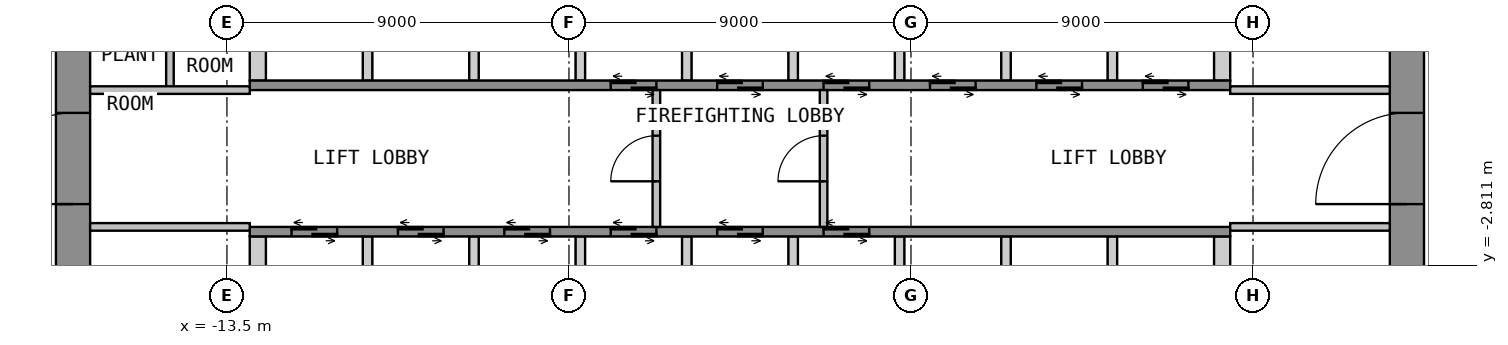
"""IFC4 building model, lengths in metres.
Left out: names, types, materials, properties, quantities, classifications, styles, units other than length and angle.
Written with IfcOpenShell. Run it as: python <this file> out.ifc"""

import sys

from ifc_helpers import new_model, si_unit, direction, frame, frame_2d, origin, place, context, subcontext, project, spatial, polyline, rectangle, outline, extrude, element, fill, save


model = new_model("IFC4")
c1 = context("Model", 3, precision=1e-05, world=origin(), true_north=direction((0.0, 1.0)))
c2 = subcontext(c1, "Body", "Model", "MODEL_VIEW")
j1 = project(units=[si_unit("LENGTHUNIT", "METRE"), si_unit("PLANEANGLEUNIT", "RADIAN")], contexts=[c1])
p1 = place(None, origin())
s1 = spatial("IfcSite", under=j1, at=p1, CompositionType="ELEMENT")
p2 = place(p1, origin())
s2 = spatial("IfcBuilding", under=s1, at=p2, CompositionType="ELEMENT")
p3 = place(p2, frame((0.0, 0.0, 15.6)))
s3 = spatial("IfcBuildingStorey", under=s2, at=p3, CompositionType="ELEMENT", Elevation=15.6)
p4 = place(p3, frame((-17.55, -12.6, 0.0), z_axis=(0.0, 0.0, 1.0), x_axis=(0.0, 1.0, 0.0)))
e1 = element("IfcWall", 1, at=p4, inside=s3, PredefinedType="SHEAR", context=c2, shape_type="SweptSolid", body=[
    extrude(rectangle(XDim=25.2, YDim=0.9, at=frame_2d((12.6, 0.0))), origin(), (0.0, 0.0, 1.0), 4.4),
])
p5 = place(p4, frame((11.4, 0.0, 0.0)))
e2 = element("IfcOpeningElement", 2, at=p5, cuts=e1, PredefinedType="OPENING", context=c2, shape_type="SweptSolid", body=[
    extrude(rectangle(XDim=2.4, YDim=2.1, at=frame_2d((1.2, 1.05))), frame((0.0, 0.46, 0.0), z_axis=(0.0, -1.0, 0.0), x_axis=(1.0, 0.0, 0.0)), (0.0, 0.0, 1.0), 0.92),
])
p6 = place(p3, frame((17.55, -12.6, 0.0), z_axis=(0.0, 0.0, 1.0), x_axis=(0.0, 1.0, 0.0)))
e3 = element("IfcWall", 3, at=p6, inside=s3, PredefinedType="SHEAR", context=c2, shape_type="SweptSolid", body=[
    extrude(rectangle(XDim=25.2, YDim=0.9, at=frame_2d((12.6, 0.0))), origin(), (0.0, 0.0, 1.0), 4.4),
])
p7 = place(p6, frame((11.4, 0.0, 0.0)))
e4 = element("IfcOpeningElement", 4, at=p7, cuts=e3, PredefinedType="OPENING", context=c2, shape_type="SweptSolid", body=[
    extrude(rectangle(XDim=2.4, YDim=2.1, at=frame_2d((1.2, 1.05))), frame((0.0, 0.46, 0.0), z_axis=(0.0, -1.0, 0.0), x_axis=(1.0, 0.0, 0.0)), (0.0, 0.0, 1.0), 0.92),
])
p8 = place(p3, origin())
e5 = element("IfcWall", 5, at=p8, inside=s3, PredefinedType="SHEAR", context=c2, shape_type="SweptSolid", body=[
    extrude(outline(polyline([(-12.9, 2.05), (-12.475, 2.05), (-12.475, 4.75), (-12.9, 4.75), (-12.9, 2.05)])), origin(), (0.0, 0.0, 1.0), 4.4),
])
p9 = place(p3, origin())
e6 = element("IfcWall", 6, at=p9, inside=s3, PredefinedType="SHEAR", context=c2, shape_type="SweptSolid", body=[
    extrude(outline(polyline([(-9.925, 2.05), (-9.675, 2.05), (-9.675, 4.75), (-9.925, 4.75), (-9.925, 2.05)])), origin(), (0.0, 0.0, 1.0), 4.4),
])
p10 = place(p3, origin())
e7 = element("IfcWall", 7, at=p10, inside=s3, PredefinedType="SHEAR", context=c2, shape_type="SweptSolid", body=[
    extrude(outline(polyline([(-7.125, 2.05), (-6.875, 2.05), (-6.875, 4.75), (-7.125, 4.75), (-7.125, 2.05)])), origin(), (0.0, 0.0, 1.0), 4.4),
])
p11 = place(p3, origin())
e8 = element("IfcWall", 8, at=p11, inside=s3, PredefinedType="SHEAR", context=c2, shape_type="SweptSolid", body=[
    extrude(outline(polyline([(-4.325, 2.05), (-4.075, 2.05), (-4.075, 4.75), (-4.325, 4.75), (-4.325, 2.05)])), origin(), (0.0, 0.0, 1.0), 4.4),
])
p12 = place(p3, origin())
e9 = element("IfcWall", 9, at=p12, inside=s3, PredefinedType="SHEAR", context=c2, shape_type="SweptSolid", body=[
    extrude(outline(polyline([(-1.525, 2.05), (-1.275, 2.05), (-1.275, 4.75), (-1.525, 4.75), (-1.525, 2.05)])), origin(), (0.0, 0.0, 1.0), 4.4),
])
p13 = place(p3, origin())
e10 = element("IfcWall", 10, at=p13, inside=s3, PredefinedType="SHEAR", context=c2, shape_type="SweptSolid", body=[
    extrude(outline(polyline([(1.275, 2.05), (1.525, 2.05), (1.525, 4.75), (1.275, 4.75), (1.275, 2.05)])), origin(), (0.0, 0.0, 1.0), 4.4),
])
p14 = place(p3, origin())
e11 = element("IfcWall", 11, at=p14, inside=s3, PredefinedType="SHEAR", context=c2, shape_type="SweptSolid", body=[
    extrude(outline(polyline([(4.075, 2.05), (4.325, 2.05), (4.325, 4.75), (4.075, 4.75), (4.075, 2.05)])), origin(), (0.0, 0.0, 1.0), 4.4),
])
p15 = place(p3, origin())
e12 = element("IfcWall", 12, at=p15, inside=s3, PredefinedType="SHEAR", context=c2, shape_type="SweptSolid", body=[
    extrude(outline(polyline([(6.875, 2.05), (7.125, 2.05), (7.125, 4.75), (6.875, 4.75), (6.875, 2.05)])), origin(), (0.0, 0.0, 1.0), 4.4),
])
p16 = place(p3, origin())
e13 = element("IfcWall", 13, at=p16, inside=s3, PredefinedType="SHEAR", context=c2, shape_type="SweptSolid", body=[
    extrude(outline(polyline([(9.675, 2.05), (9.925, 2.05), (9.925, 4.75), (9.675, 4.75), (9.675, 2.05)])), origin(), (0.0, 0.0, 1.0), 4.4),
])
p17 = place(p3, origin())
e14 = element("IfcWall", 14, at=p17, inside=s3, PredefinedType="SHEAR", context=c2, shape_type="SweptSolid", body=[
    extrude(outline(polyline([(12.475, 2.05), (12.9, 2.05), (12.9, 4.75), (12.475, 4.75), (12.475, 2.05)])), origin(), (0.0, 0.0, 1.0), 4.4),
])
p18 = place(p3, frame((-12.9, 1.925, 0.0), z_axis=(0.0, 0.0, 1.0), x_axis=(1.0, 0.0, 0.0)))
e15 = element("IfcWall", 15, at=p18, inside=s3, PredefinedType="SHEAR", context=c2, shape_type="SweptSolid", body=[
    extrude(rectangle(XDim=25.8, YDim=0.25, at=frame_2d((12.9, 0.0))), origin(), (0.0, 0.0, 1.0), 4.4),
])
p19 = place(p18, frame((9.5, 0.0, 0.0)))
e16 = element("IfcOpeningElement", 16, at=p19, cuts=e15, PredefinedType="OPENING", context=c2, shape_type="SweptSolid", body=[
    extrude(rectangle(XDim=1.2, YDim=2.1, at=frame_2d((0.6, 1.05))), frame((0.0, 0.135, 0.0), z_axis=(0.0, -1.0, 0.0), x_axis=(1.0, 0.0, 0.0)), (0.0, 0.0, 1.0), 0.27),
])
p20 = place(p18, frame((12.3, 0.0, 0.0)))
e17 = element("IfcOpeningElement", 17, at=p20, cuts=e15, PredefinedType="OPENING", context=c2, shape_type="SweptSolid", body=[
    extrude(rectangle(XDim=1.2, YDim=2.1, at=frame_2d((0.6, 1.05))), frame((0.0, 0.135, 0.0), z_axis=(0.0, -1.0, 0.0), x_axis=(1.0, 0.0, 0.0)), (0.0, 0.0, 1.0), 0.27),
])
p21 = place(p18, frame((15.1, 0.0, 0.0)))
e18 = element("IfcOpeningElement", 18, at=p21, cuts=e15, PredefinedType="OPENING", context=c2, shape_type="SweptSolid", body=[
    extrude(rectangle(XDim=1.2, YDim=2.1, at=frame_2d((0.6, 1.05))), frame((0.0, 0.135, 0.0), z_axis=(0.0, -1.0, 0.0), x_axis=(1.0, 0.0, 0.0)), (0.0, 0.0, 1.0), 0.27),
])
p22 = place(p18, frame((17.9, 0.0, 0.0)))
e19 = element("IfcOpeningElement", 19, at=p22, cuts=e15, PredefinedType="OPENING", context=c2, shape_type="SweptSolid", body=[
    extrude(rectangle(XDim=1.2, YDim=2.1, at=frame_2d((0.6, 1.05))), frame((0.0, 0.135, 0.0), z_axis=(0.0, -1.0, 0.0), x_axis=(1.0, 0.0, 0.0)), (0.0, 0.0, 1.0), 0.27),
])
p23 = place(p18, frame((20.7, 0.0, 0.0)))
e20 = element("IfcOpeningElement", 20, at=p23, cuts=e15, PredefinedType="OPENING", context=c2, shape_type="SweptSolid", body=[
    extrude(rectangle(XDim=1.2, YDim=2.1, at=frame_2d((0.6, 1.05))), frame((0.0, 0.135, 0.0), z_axis=(0.0, -1.0, 0.0), x_axis=(1.0, 0.0, 0.0)), (0.0, 0.0, 1.0), 0.27),
])
p24 = place(p18, frame((23.5, 0.0, 0.0)))
e21 = element("IfcOpeningElement", 21, at=p24, cuts=e15, PredefinedType="OPENING", context=c2, shape_type="SweptSolid", body=[
    extrude(rectangle(XDim=1.2, YDim=2.1, at=frame_2d((0.6, 1.05))), frame((0.0, 0.135, 0.0), z_axis=(0.0, -1.0, 0.0), x_axis=(1.0, 0.0, 0.0)), (0.0, 0.0, 1.0), 0.27),
])
p25 = place(p3, origin())
e22 = element("IfcWall", 22, at=p25, inside=s3, PredefinedType="SHEAR", context=c2, shape_type="SweptSolid", body=[
    extrude(outline(polyline([(-12.9, -4.75), (-12.475, -4.75), (-12.475, -2.05), (-12.9, -2.05), (-12.9, -4.75)])), origin(), (0.0, 0.0, 1.0), 4.4),
])
p26 = place(p3, origin())
e23 = element("IfcWall", 23, at=p26, inside=s3, PredefinedType="SHEAR", context=c2, shape_type="SweptSolid", body=[
    extrude(outline(polyline([(-9.925, -4.75), (-9.675, -4.75), (-9.675, -2.05), (-9.925, -2.05), (-9.925, -4.75)])), origin(), (0.0, 0.0, 1.0), 4.4),
])
p27 = place(p3, origin())
e24 = element("IfcWall", 24, at=p27, inside=s3, PredefinedType="SHEAR", context=c2, shape_type="SweptSolid", body=[
    extrude(outline(polyline([(-7.125, -4.75), (-6.875, -4.75), (-6.875, -2.05), (-7.125, -2.05), (-7.125, -4.75)])), origin(), (0.0, 0.0, 1.0), 4.4),
])
p28 = place(p3, origin())
e25 = element("IfcWall", 25, at=p28, inside=s3, PredefinedType="SHEAR", context=c2, shape_type="SweptSolid", body=[
    extrude(outline(polyline([(-4.325, -4.75), (-4.075, -4.75), (-4.075, -2.05), (-4.325, -2.05), (-4.325, -4.75)])), origin(), (0.0, 0.0, 1.0), 4.4),
])
p29 = place(p3, origin())
e26 = element("IfcWall", 26, at=p29, inside=s3, PredefinedType="SHEAR", context=c2, shape_type="SweptSolid", body=[
    extrude(outline(polyline([(-1.525, -4.75), (-1.275, -4.75), (-1.275, -2.05), (-1.525, -2.05), (-1.525, -4.75)])), origin(), (0.0, 0.0, 1.0), 4.4),
])
p30 = place(p3, origin())
e27 = element("IfcWall", 27, at=p30, inside=s3, PredefinedType="SHEAR", context=c2, shape_type="SweptSolid", body=[
    extrude(outline(polyline([(1.275, -4.75), (1.525, -4.75), (1.525, -2.05), (1.275, -2.05), (1.275, -4.75)])), origin(), (0.0, 0.0, 1.0), 4.4),
])
p31 = place(p3, origin())
e28 = element("IfcWall", 28, at=p31, inside=s3, PredefinedType="SHEAR", context=c2, shape_type="SweptSolid", body=[
    extrude(outline(polyline([(4.075, -4.75), (4.325, -4.75), (4.325, -2.05), (4.075, -2.05), (4.075, -4.75)])), origin(), (0.0, 0.0, 1.0), 4.4),
])
p32 = place(p3, origin())
e29 = element("IfcWall", 29, at=p32, inside=s3, PredefinedType="SHEAR", context=c2, shape_type="SweptSolid", body=[
    extrude(outline(polyline([(6.875, -4.75), (7.125, -4.75), (7.125, -2.05), (6.875, -2.05), (6.875, -4.75)])), origin(), (0.0, 0.0, 1.0), 4.4),
])
p33 = place(p3, origin())
e30 = element("IfcWall", 30, at=p33, inside=s3, PredefinedType="SHEAR", context=c2, shape_type="SweptSolid", body=[
    extrude(outline(polyline([(9.675, -4.75), (9.925, -4.75), (9.925, -2.05), (9.675, -2.05), (9.675, -4.75)])), origin(), (0.0, 0.0, 1.0), 4.4),
])
p34 = place(p3, origin())
e31 = element("IfcWall", 31, at=p34, inside=s3, PredefinedType="SHEAR", context=c2, shape_type="SweptSolid", body=[
    extrude(outline(polyline([(12.475, -4.75), (12.9, -4.75), (12.9, -2.05), (12.475, -2.05), (12.475, -4.75)])), origin(), (0.0, 0.0, 1.0), 4.4),
])
p35 = place(p3, frame((-12.9, -1.925, 0.0), z_axis=(0.0, 0.0, 1.0), x_axis=(1.0, 0.0, 0.0)))
e32 = element("IfcWall", 32, at=p35, inside=s3, PredefinedType="SHEAR", context=c2, shape_type="SweptSolid", body=[
    extrude(rectangle(XDim=25.8, YDim=0.25, at=frame_2d((12.9, 0.0))), origin(), (0.0, 0.0, 1.0), 4.4),
])
p36 = place(p35, frame((1.1, 0.0, 0.0)))
e33 = element("IfcOpeningElement", 33, at=p36, cuts=e32, PredefinedType="OPENING", context=c2, shape_type="SweptSolid", body=[
    extrude(rectangle(XDim=1.2, YDim=2.1, at=frame_2d((0.6, 1.05))), frame((0.0, 0.135, 0.0), z_axis=(0.0, -1.0, 0.0), x_axis=(1.0, 0.0, 0.0)), (0.0, 0.0, 1.0), 0.27),
])
p37 = place(p35, frame((3.9, 0.0, 0.0)))
e34 = element("IfcOpeningElement", 34, at=p37, cuts=e32, PredefinedType="OPENING", context=c2, shape_type="SweptSolid", body=[
    extrude(rectangle(XDim=1.2, YDim=2.1, at=frame_2d((0.6, 1.05))), frame((0.0, 0.135, 0.0), z_axis=(0.0, -1.0, 0.0), x_axis=(1.0, 0.0, 0.0)), (0.0, 0.0, 1.0), 0.27),
])
p38 = place(p35, frame((6.7, 0.0, 0.0)))
e35 = element("IfcOpeningElement", 35, at=p38, cuts=e32, PredefinedType="OPENING", context=c2, shape_type="SweptSolid", body=[
    extrude(rectangle(XDim=1.2, YDim=2.1, at=frame_2d((0.6, 1.05))), frame((0.0, 0.135, 0.0), z_axis=(0.0, -1.0, 0.0), x_axis=(1.0, 0.0, 0.0)), (0.0, 0.0, 1.0), 0.27),
])
p39 = place(p35, frame((9.5, 0.0, 0.0)))
e36 = element("IfcOpeningElement", 36, at=p39, cuts=e32, PredefinedType="OPENING", context=c2, shape_type="SweptSolid", body=[
    extrude(rectangle(XDim=1.2, YDim=2.1, at=frame_2d((0.6, 1.05))), frame((0.0, 0.135, 0.0), z_axis=(0.0, -1.0, 0.0), x_axis=(1.0, 0.0, 0.0)), (0.0, 0.0, 1.0), 0.27),
])
p40 = place(p35, frame((12.3, 0.0, 0.0)))
e37 = element("IfcOpeningElement", 37, at=p40, cuts=e32, PredefinedType="OPENING", context=c2, shape_type="SweptSolid", body=[
    extrude(rectangle(XDim=1.2, YDim=2.1, at=frame_2d((0.6, 1.05))), frame((0.0, 0.135, 0.0), z_axis=(0.0, -1.0, 0.0), x_axis=(1.0, 0.0, 0.0)), (0.0, 0.0, 1.0), 0.27),
])
p41 = place(p35, frame((15.1, 0.0, 0.0)))
e38 = element("IfcOpeningElement", 38, at=p41, cuts=e32, PredefinedType="OPENING", context=c2, shape_type="SweptSolid", body=[
    extrude(rectangle(XDim=1.2, YDim=2.1, at=frame_2d((0.6, 1.05))), frame((0.0, 0.135, 0.0), z_axis=(0.0, -1.0, 0.0), x_axis=(1.0, 0.0, 0.0)), (0.0, 0.0, 1.0), 0.27),
])
p42 = place(p3, frame((-2.2, -1.8, 0.0), z_axis=(0.0, 0.0, 1.0), x_axis=(0.0, 1.0, 0.0)))
e39 = element("IfcWall", 39, at=p42, inside=s3, PredefinedType="PARTITIONING", context=c2, shape_type="SweptSolid", body=[
    extrude(rectangle(XDim=3.6, YDim=0.2, at=frame_2d((1.8, 0.0))), origin(), (0.0, 0.0, 1.0), 4.4),
])
p43 = place(p42, frame((1.2, 0.0, 0.0)))
e40 = element("IfcOpeningElement", 40, at=p43, cuts=e39, PredefinedType="OPENING", context=c2, shape_type="SweptSolid", body=[
    extrude(rectangle(XDim=1.2, YDim=2.1, at=frame_2d((0.6, 1.05))), frame((0.0, 0.11, 0.0), z_axis=(0.0, -1.0, 0.0), x_axis=(1.0, 0.0, 0.0)), (0.0, 0.0, 1.0), 0.22),
])
p44 = place(p3, frame((2.2, -1.8, 0.0), z_axis=(0.0, 0.0, 1.0), x_axis=(0.0, 1.0, 0.0)))
e41 = element("IfcWall", 41, at=p44, inside=s3, PredefinedType="PARTITIONING", context=c2, shape_type="SweptSolid", body=[
    extrude(rectangle(XDim=3.6, YDim=0.2, at=frame_2d((1.8, 0.0))), origin(), (0.0, 0.0, 1.0), 4.4),
])
p45 = place(p44, frame((1.2, 0.0, 0.0)))
e42 = element("IfcOpeningElement", 42, at=p45, cuts=e41, PredefinedType="OPENING", context=c2, shape_type="SweptSolid", body=[
    extrude(rectangle(XDim=1.2, YDim=2.1, at=frame_2d((0.6, 1.05))), frame((0.0, 0.11, 0.0), z_axis=(0.0, -1.0, 0.0), x_axis=(1.0, 0.0, 0.0)), (0.0, 0.0, 1.0), 0.22),
])
p46 = place(p3, frame((-15.0, 1.8, 0.0), z_axis=(0.0, 0.0, 1.0), x_axis=(0.0, 1.0, 0.0)))
e43 = element("IfcWall", 43, at=p46, inside=s3, PredefinedType="PARTITIONING", context=c2, shape_type="SweptSolid", body=[
    extrude(rectangle(XDim=3.2, YDim=0.2, at=frame_2d((1.6, 0.0))), origin(), (0.0, 0.0, 1.0), 4.4),
])
for number, where, z_axis, x_axis in (
    (44, (-17.1, 1.8, 0.0), (0.0, 0.0, 1.0), (1.0, 0.0, 0.0)),
    (45, (12.9, 1.8, 0.0), (0.0, 0.0, 1.0), (1.0, 0.0, 0.0)),
    (46, (-17.1, -1.8, 0.0), (0.0, 0.0, 1.0), (1.0, 0.0, 0.0)),
    (47, (12.9, -1.8, 0.0), (0.0, 0.0, 1.0), (1.0, 0.0, 0.0)),
):
    element("IfcWall", number, at=place(p3, frame(where, z_axis=z_axis, x_axis=x_axis)), inside=s3, PredefinedType="PARTITIONING", context=c2, shape_type="SweptSolid", body=[
        extrude(rectangle(XDim=4.2, YDim=0.2, at=frame_2d((2.1, 0.0))), origin(), (0.0, 0.0, 1.0), 4.4),
    ])
p47 = place(p5, origin())
e48 = element("IfcDoor", 48, at=p47, inside=s3, OperationType="DOUBLE_DOOR_DOUBLE_SWING", PredefinedType="DOOR", context=c2, shape_type="SweptSolid", body=[
    extrude(rectangle(XDim=2.4, YDim=2.1, at=frame_2d((1.2, 1.05))), frame((0.0, 0.025, 0.0), z_axis=(0.0, -1.0, 0.0), x_axis=(1.0, 0.0, 0.0)), (0.0, 0.0, 1.0), 0.05),
])
fill(e2, e48)
p48 = place(p7, origin())
e49 = element("IfcDoor", 49, at=p48, inside=s3, OperationType="DOUBLE_DOOR_DOUBLE_SWING", PredefinedType="DOOR", context=c2, shape_type="SweptSolid", body=[
    extrude(rectangle(XDim=2.4, YDim=2.1, at=frame_2d((1.2, 1.05))), frame((0.0, 0.025, 0.0), z_axis=(0.0, -1.0, 0.0), x_axis=(1.0, 0.0, 0.0)), (0.0, 0.0, 1.0), 0.05),
])
fill(e4, e49)
p49 = place(p19, origin())
e50 = element("IfcDoor", 50, at=p49, inside=s3, OperationType="DOUBLE_DOOR_SLIDING", PredefinedType="DOOR", context=c2, shape_type="SweptSolid", body=[
    extrude(rectangle(XDim=1.2, YDim=2.1, at=frame_2d((0.6, 1.05))), frame((0.0, 0.025, 0.0), z_axis=(0.0, -1.0, 0.0), x_axis=(1.0, 0.0, 0.0)), (0.0, 0.0, 1.0), 0.05),
])
fill(e16, e50)
p50 = place(p20, origin())
e51 = element("IfcDoor", 51, at=p50, inside=s3, OperationType="DOUBLE_DOOR_SLIDING", PredefinedType="DOOR", context=c2, shape_type="SweptSolid", body=[
    extrude(rectangle(XDim=1.2, YDim=2.1, at=frame_2d((0.6, 1.05))), frame((0.0, 0.025, 0.0), z_axis=(0.0, -1.0, 0.0), x_axis=(1.0, 0.0, 0.0)), (0.0, 0.0, 1.0), 0.05),
])
fill(e17, e51)
p51 = place(p21, origin())
e52 = element("IfcDoor", 52, at=p51, inside=s3, OperationType="DOUBLE_DOOR_SLIDING", PredefinedType="DOOR", context=c2, shape_type="SweptSolid", body=[
    extrude(rectangle(XDim=1.2, YDim=2.1, at=frame_2d((0.6, 1.05))), frame((0.0, 0.025, 0.0), z_axis=(0.0, -1.0, 0.0), x_axis=(1.0, 0.0, 0.0)), (0.0, 0.0, 1.0), 0.05),
])
fill(e18, e52)
p52 = place(p22, origin())
e53 = element("IfcDoor", 53, at=p52, inside=s3, OperationType="DOUBLE_DOOR_SLIDING", PredefinedType="DOOR", context=c2, shape_type="SweptSolid", body=[
    extrude(rectangle(XDim=1.2, YDim=2.1, at=frame_2d((0.6, 1.05))), frame((0.0, 0.025, 0.0), z_axis=(0.0, -1.0, 0.0), x_axis=(1.0, 0.0, 0.0)), (0.0, 0.0, 1.0), 0.05),
])
fill(e19, e53)
p53 = place(p23, origin())
e54 = element("IfcDoor", 54, at=p53, inside=s3, OperationType="DOUBLE_DOOR_SLIDING", PredefinedType="DOOR", context=c2, shape_type="SweptSolid", body=[
    extrude(rectangle(XDim=1.2, YDim=2.1, at=frame_2d((0.6, 1.05))), frame((0.0, 0.025, 0.0), z_axis=(0.0, -1.0, 0.0), x_axis=(1.0, 0.0, 0.0)), (0.0, 0.0, 1.0), 0.05),
])
fill(e20, e54)
p54 = place(p24, origin())
e55 = element("IfcDoor", 55, at=p54, inside=s3, OperationType="DOUBLE_DOOR_SLIDING", PredefinedType="DOOR", context=c2, shape_type="SweptSolid", body=[
    extrude(rectangle(XDim=1.2, YDim=2.1, at=frame_2d((0.6, 1.05))), frame((0.0, 0.025, 0.0), z_axis=(0.0, -1.0, 0.0), x_axis=(1.0, 0.0, 0.0)), (0.0, 0.0, 1.0), 0.05),
])
fill(e21, e55)
p55 = place(p36, origin())
e56 = element("IfcDoor", 56, at=p55, inside=s3, OperationType="DOUBLE_DOOR_SLIDING", PredefinedType="DOOR", context=c2, shape_type="SweptSolid", body=[
    extrude(rectangle(XDim=1.2, YDim=2.1, at=frame_2d((0.6, 1.05))), frame((0.0, 0.025, 0.0), z_axis=(0.0, -1.0, 0.0), x_axis=(1.0, 0.0, 0.0)), (0.0, 0.0, 1.0), 0.05),
])
fill(e33, e56)
p56 = place(p37, origin())
e57 = element("IfcDoor", 57, at=p56, inside=s3, OperationType="DOUBLE_DOOR_SLIDING", PredefinedType="DOOR", context=c2, shape_type="SweptSolid", body=[
    extrude(rectangle(XDim=1.2, YDim=2.1, at=frame_2d((0.6, 1.05))), frame((0.0, 0.025, 0.0), z_axis=(0.0, -1.0, 0.0), x_axis=(1.0, 0.0, 0.0)), (0.0, 0.0, 1.0), 0.05),
])
fill(e34, e57)
p57 = place(p38, origin())
e58 = element("IfcDoor", 58, at=p57, inside=s3, OperationType="DOUBLE_DOOR_SLIDING", PredefinedType="DOOR", context=c2, shape_type="SweptSolid", body=[
    extrude(rectangle(XDim=1.2, YDim=2.1, at=frame_2d((0.6, 1.05))), frame((0.0, 0.025, 0.0), z_axis=(0.0, -1.0, 0.0), x_axis=(1.0, 0.0, 0.0)), (0.0, 0.0, 1.0), 0.05),
])
fill(e35, e58)
p58 = place(p39, origin())
e59 = element("IfcDoor", 59, at=p58, inside=s3, OperationType="DOUBLE_DOOR_SLIDING", PredefinedType="DOOR", context=c2, shape_type="SweptSolid", body=[
    extrude(rectangle(XDim=1.2, YDim=2.1, at=frame_2d((0.6, 1.05))), frame((0.0, 0.025, 0.0), z_axis=(0.0, -1.0, 0.0), x_axis=(1.0, 0.0, 0.0)), (0.0, 0.0, 1.0), 0.05),
])
fill(e36, e59)
p59 = place(p40, origin())
e60 = element("IfcDoor", 60, at=p59, inside=s3, OperationType="DOUBLE_DOOR_SLIDING", PredefinedType="DOOR", context=c2, shape_type="SweptSolid", body=[
    extrude(rectangle(XDim=1.2, YDim=2.1, at=frame_2d((0.6, 1.05))), frame((0.0, 0.025, 0.0), z_axis=(0.0, -1.0, 0.0), x_axis=(1.0, 0.0, 0.0)), (0.0, 0.0, 1.0), 0.05),
])
fill(e37, e60)
p60 = place(p41, origin())
e61 = element("IfcDoor", 61, at=p60, inside=s3, OperationType="DOUBLE_DOOR_SLIDING", PredefinedType="DOOR", context=c2, shape_type="SweptSolid", body=[
    extrude(rectangle(XDim=1.2, YDim=2.1, at=frame_2d((0.6, 1.05))), frame((0.0, 0.025, 0.0), z_axis=(0.0, -1.0, 0.0), x_axis=(1.0, 0.0, 0.0)), (0.0, 0.0, 1.0), 0.05),
])
fill(e38, e61)
p61 = place(p43, origin())
e62 = element("IfcDoor", 62, at=p61, inside=s3, OperationType="SINGLE_SWING_LEFT", PredefinedType="DOOR", context=c2, shape_type="SweptSolid", body=[
    extrude(rectangle(XDim=1.2, YDim=2.1, at=frame_2d((0.6, 1.05))), frame((0.0, 0.025, 0.0), z_axis=(0.0, -1.0, 0.0), x_axis=(1.0, 0.0, 0.0)), (0.0, 0.0, 1.0), 0.05),
])
fill(e40, e62)
p62 = place(p45, origin())
e63 = element("IfcDoor", 63, at=p62, inside=s3, OperationType="SINGLE_SWING_LEFT", PredefinedType="DOOR", context=c2, shape_type="SweptSolid", body=[
    extrude(rectangle(XDim=1.2, YDim=2.1, at=frame_2d((0.6, 1.05))), frame((0.0, 0.025, 0.0), z_axis=(0.0, -1.0, 0.0), x_axis=(1.0, 0.0, 0.0)), (0.0, 0.0, 1.0), 0.05),
])
fill(e42, e63)
save(model, sys.argv[1])
